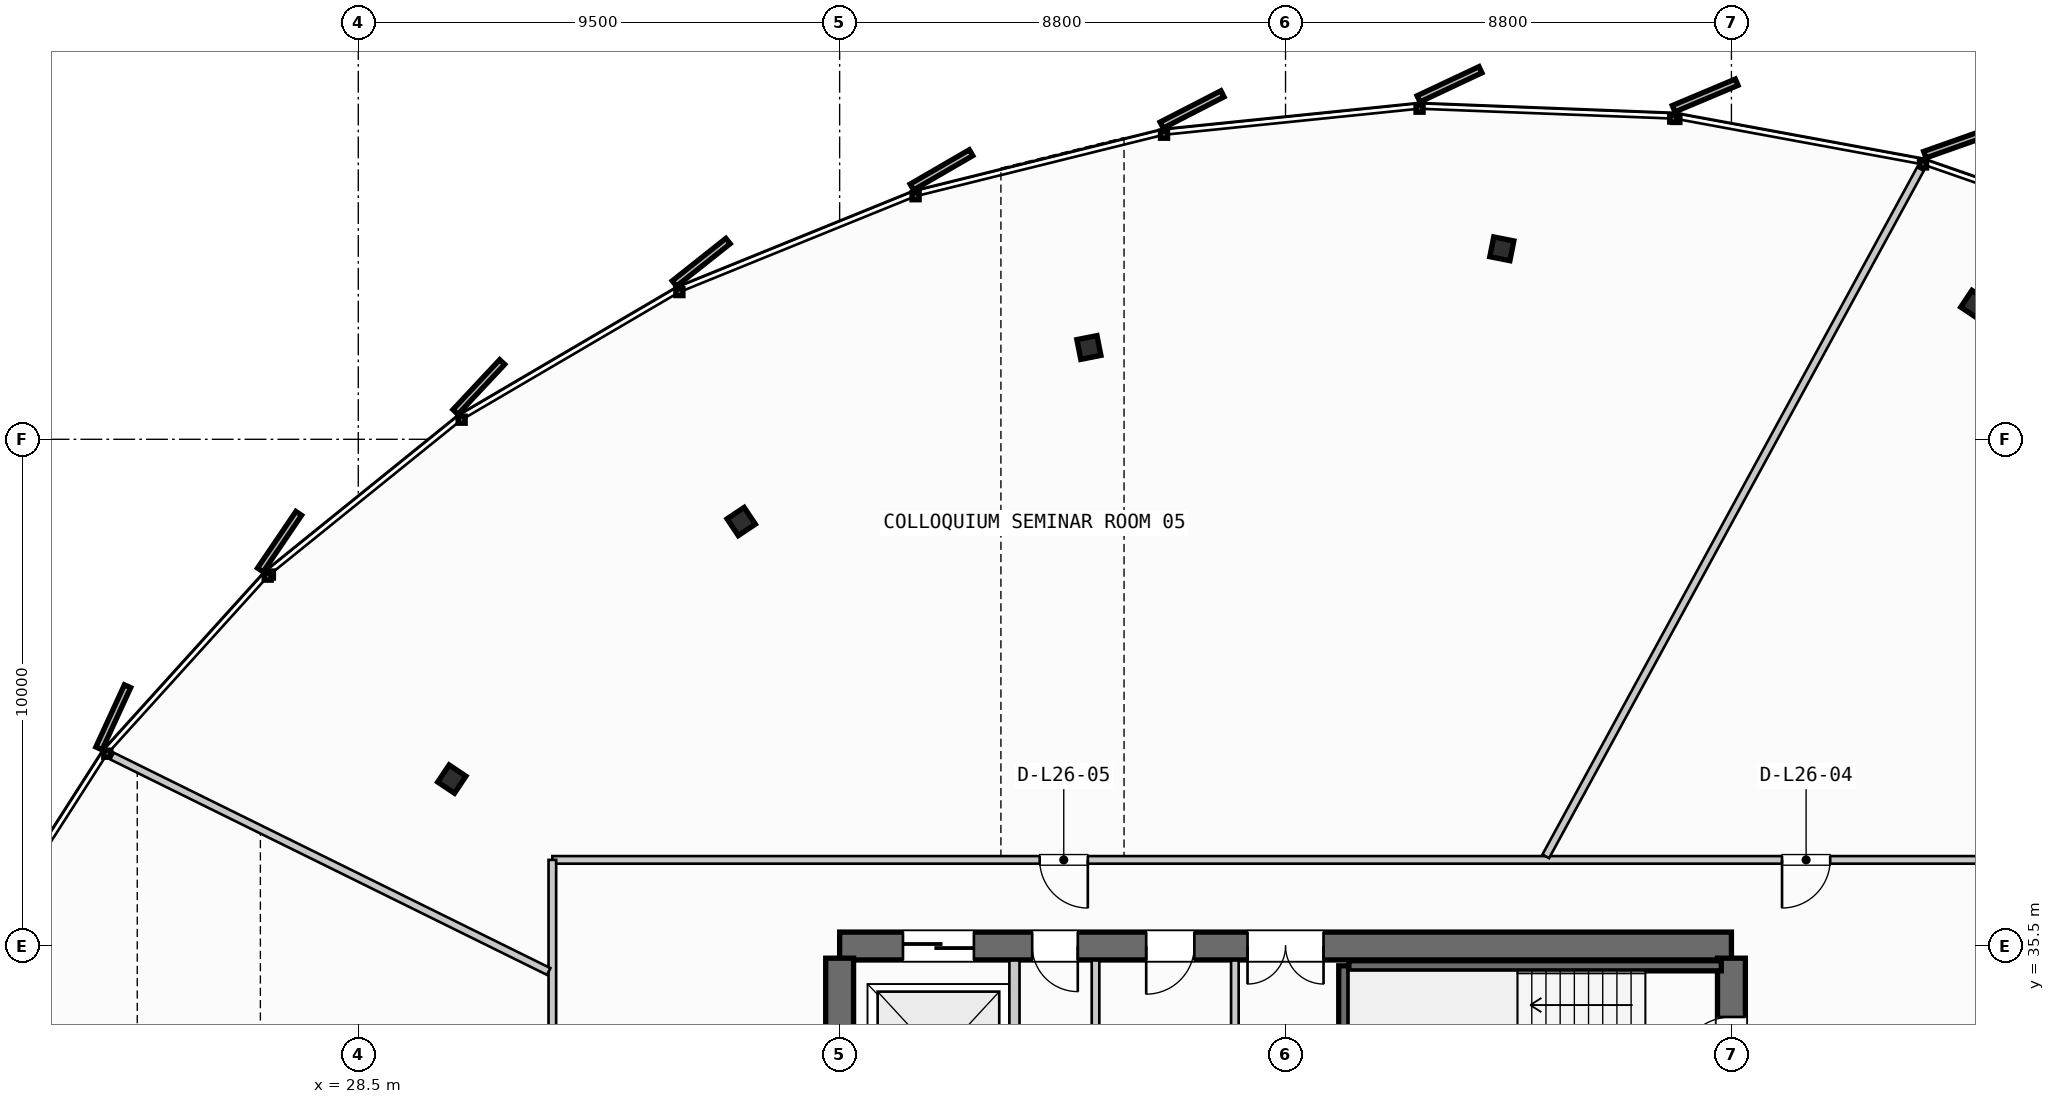
"""IFC4 building model, lengths in metres.
Left out: names, types, materials, properties, quantities, classifications, styles, units other than length and angle.
Written with IfcOpenShell. Run it as: python <this file> out.ifc"""

import sys

from ifc_helpers import new_model, si_unit, direction, frame, frame_2d, origin, origin_2d, place, context, subcontext, project, spatial, rectangle, i_section, extrude, source, transform, mapped, element, fill, save


model = new_model("IFC4")
c1 = context("Model", 3, precision=1e-05, world=origin(), true_north=direction((0.0, 1.0)))
c2 = subcontext(c1, "Body", "Model", "MODEL_VIEW")
j1 = project(units=[si_unit("LENGTHUNIT", "METRE"), si_unit("PLANEANGLEUNIT", "RADIAN")], contexts=[c1])
p1 = place(None, origin())
s1 = spatial("IfcSite", under=j1, at=p1, CompositionType="ELEMENT")
p2 = place(p1, origin())
s2 = spatial("IfcBuilding", under=s1, at=p2, CompositionType="ELEMENT")
p3 = place(p2, frame((0.0, 0.0, 107.2)))
s3 = spatial("IfcBuildingStorey", under=s2, at=p3, CompositionType="ELEMENT", Elevation=107.2)
p4 = place(p3, frame((55.6, 35.5, 0.0), z_axis=(0.0, 0.0, 1.0), x_axis=(-1.0, 0.0, 0.0)))
e1 = element("IfcWall", 1, at=p4, inside=s3, PredefinedType="SHEAR", context=c2, shape_type="SweptSolid", body=[
    extrude(rectangle(XDim=17.6, YDim=0.55, at=frame_2d((8.8, 0.0))), origin(), (0.0, 0.0, 1.0), 3.35),
])
p5 = place(p4, frame((8.05, 0.0, 0.0)))
e2 = element("IfcOpeningElement", 2, at=p5, cuts=e1, PredefinedType="OPENING", context=c2, shape_type="SweptSolid", body=[
    extrude(rectangle(XDim=1.5, YDim=2.2, at=frame_2d((0.75, 1.1))), frame((0.0, 0.285, 0.0), z_axis=(0.0, -1.0, 0.0), x_axis=(1.0, 0.0, 0.0)), (0.0, 0.0, 1.0), 0.57),
])
p6 = place(p4, frame((14.95, 0.0, 0.0)))
e3 = element("IfcOpeningElement", 3, at=p6, cuts=e1, PredefinedType="OPENING", context=c2, shape_type="SweptSolid", body=[
    extrude(rectangle(XDim=1.4, YDim=2.3, at=frame_2d((0.7, 1.15))), frame((0.0, 0.285, 0.0), z_axis=(0.0, -1.0, 0.0), x_axis=(1.0, 0.0, 0.0)), (0.0, 0.0, 1.0), 0.57),
])
p7 = place(p4, frame((12.9, 0.0, 0.0)))
e4 = element("IfcOpeningElement", 4, at=p7, cuts=e1, PredefinedType="OPENING", context=c2, shape_type="SweptSolid", body=[
    extrude(rectangle(XDim=0.9, YDim=2.15, at=frame_2d((0.45, 1.075))), frame((0.0, 0.285, 0.0), z_axis=(0.0, -1.0, 0.0), x_axis=(1.0, 0.0, 0.0)), (0.0, 0.0, 1.0), 0.57),
])
p8 = place(p4, frame((10.6, 0.0, 0.0)))
e5 = element("IfcOpeningElement", 5, at=p8, cuts=e1, PredefinedType="OPENING", context=c2, shape_type="SweptSolid", body=[
    extrude(rectangle(XDim=0.95, YDim=2.15, at=frame_2d((0.475, 1.075))), frame((0.0, 0.285, 0.0), z_axis=(0.0, -1.0, 0.0), x_axis=(1.0, 0.0, 0.0)), (0.0, 0.0, 1.0), 0.57),
])
p9 = place(p3, frame((38.0, 35.26, 0.0), z_axis=(0.0, 0.0, 1.0), x_axis=(0.0, -1.0, 0.0)))
e6 = element("IfcWall", 6, at=p9, inside=s3, PredefinedType="SHEAR", context=c2, shape_type="SweptSolid", body=[
    extrude(rectangle(XDim=14.92, YDim=0.55, at=frame_2d((7.46, 0.0))), origin(), (0.0, 0.0, 1.0), 3.35),
])
p10 = place(p9, frame((5.21, 0.0, 0.0)))
e7 = element("IfcOpeningElement", 7, at=p10, cuts=e6, PredefinedType="OPENING", context=c2, shape_type="SweptSolid", body=[
    extrude(rectangle(XDim=1.1, YDim=2.2, at=frame_2d((0.55, 1.1))), frame((0.0, 0.285, 0.0), z_axis=(0.0, -1.0, 0.0), x_axis=(1.0, 0.0, 0.0)), (0.0, 0.0, 1.0), 0.57),
])
p11 = place(p3, frame((55.6, 20.34, 0.0), z_axis=(0.0, 0.0, 1.0), x_axis=(0.0, 1.0, 0.0)))
e8 = element("IfcWall", 8, at=p11, inside=s3, PredefinedType="SHEAR", context=c2, shape_type="SweptSolid", body=[
    extrude(rectangle(XDim=14.92, YDim=0.55, at=frame_2d((7.46, 0.0))), origin(), (0.0, 0.0, 1.0), 3.35),
])
p12 = place(p11, frame((12.71, 0.0, 0.0)))
e9 = element("IfcOpeningElement", 9, at=p12, cuts=e8, PredefinedType="OPENING", context=c2, shape_type="SweptSolid", body=[
    extrude(rectangle(XDim=1.05, YDim=2.15, at=frame_2d((0.525, 1.075))), frame((0.0, 0.285, 0.0), z_axis=(0.0, -1.0, 0.0), x_axis=(1.0, 0.0, 0.0)), (0.0, 0.0, 1.0), 0.57),
])
p13 = place(p11, frame((8.61, 0.0, 0.0)))
e10 = element("IfcOpeningElement", 10, at=p13, cuts=e8, PredefinedType="OPENING", context=c2, shape_type="SweptSolid", body=[
    extrude(rectangle(XDim=1.1, YDim=2.2, at=frame_2d((0.55, 1.1))), frame((0.0, 0.285, 0.0), z_axis=(0.0, -1.0, 0.0), x_axis=(1.0, 0.0, 0.0)), (0.0, 0.0, 1.0), 0.57),
])
m1 = source(origin(), c2, "Body", "SweptSolid", [
    extrude(i_section(OverallWidth=0.405, OverallDepth=0.398, WebThickness=0.035, FlangeThickness=0.056, FilletRadius=0.015, at=origin_2d()), origin(), (0.0, 0.0, 1.0), 3.35),
])
for number, where, z_axis, x_axis in (
    (11, (60.405, 48.161, 0.0), (0.0, 0.0, 1.0), (0.556, 0.831, 0.0)),
    (12, (51.069, 49.259, 0.0), (0.0, 0.0, 1.0), (0.195, 0.981, 0.0)),
    (13, (42.919, 47.311, 0.0), (0.0, 0.0, 1.0), (-0.195, 0.981, 0.0)),
    (14, (36.058, 43.877, 0.0), (0.0, 0.0, 1.0), (-0.556, 0.831, 0.0)),
    (15, (30.346, 38.794, 0.0), (0.0, 0.0, 1.0), (-0.831, 0.556, 0.0)),
):
    element("IfcColumn", number, at=place(p3, frame(where, z_axis=z_axis, x_axis=x_axis)), inside=s3, PredefinedType="COLUMN", context=c2, shape_type="MappedRepresentation", body=[
        mapped(m1, transform((0.0, 0.0, 0.0), scale=1.0)),
    ])
p14 = place(p3, frame((47.95, 32.05, 0.0), z_axis=(0.0, 0.0, 1.0), x_axis=(0.0, 1.0, 0.0)))
e16 = element("IfcWall", 16, at=p14, inside=s3, PredefinedType="SHEAR", context=c2, shape_type="SweptSolid", body=[
    extrude(rectangle(XDim=3.06, YDim=0.2, at=frame_2d((1.53, 0.0))), origin(), (0.0, 0.0, 1.0), 3.35),
])
p15 = place(p3, frame((48.05, 35.11, 0.0), z_axis=(0.0, 0.0, 1.0), x_axis=(1.0, 0.0, 0.0)))
e17 = element("IfcWall", 17, at=p15, inside=s3, PredefinedType="SHEAR", context=c2, shape_type="SweptSolid", body=[
    extrude(rectangle(XDim=7.35, YDim=0.2, at=frame_2d((3.675, 0.0))), origin(), (0.0, 0.0, 1.0), 3.35),
])
p16 = place(p3, frame((41.45, 31.85, 0.0), z_axis=(0.0, 0.0, 1.0), x_axis=(0.0, 1.0, 0.0)))
e18 = element("IfcWall", 18, at=p16, inside=s3, PredefinedType="PARTITIONING", context=c2, shape_type="SweptSolid", body=[
    extrude(rectangle(XDim=3.365, YDim=0.2, at=frame_2d((1.683, 0.0))), origin(), (0.0, 0.0, 1.0), 2.28),
])
p17 = place(p3, frame((45.8, 31.85, 0.0), z_axis=(0.0, 0.0, 1.0), x_axis=(0.0, 1.0, 0.0)))
e19 = element("IfcWall", 19, at=p17, inside=s3, PredefinedType="PARTITIONING", context=c2, shape_type="SweptSolid", body=[
    extrude(rectangle(XDim=3.365, YDim=0.15, at=frame_2d((1.683, 0.0))), origin(), (0.0, 0.0, 1.0), 2.28),
])
p18 = place(p3, frame((43.05, 31.85, 0.0), z_axis=(0.0, 0.0, 1.0), x_axis=(0.0, 1.0, 0.0)))
e20 = element("IfcWall", 20, at=p18, inside=s3, PredefinedType="PLUMBINGWALL", context=c2, shape_type="SweptSolid", body=[
    extrude(rectangle(XDim=3.365, YDim=0.15, at=frame_2d((1.683, 0.0))), origin(), (0.0, 0.0, 1.0), 2.28),
])
p19 = place(p3, frame((62.83, 37.2, 0.0), z_axis=(0.0, 0.0, 1.0), x_axis=(-1.0, 0.0, 0.0)))
e21 = element("IfcWall", 21, at=p19, inside=s3, PredefinedType="PARTITIONING", context=c2, shape_type="SweptSolid", body=[
    extrude(rectangle(XDim=30.5, YDim=0.15, at=frame_2d((15.25, 0.0))), origin(), (0.0, 0.0, 1.0), 2.28),
])
p20 = place(p19, frame((5.281, 0.0, 0.0)))
e22 = element("IfcOpeningElement", 22, at=p20, cuts=e21, PredefinedType="OPENING", context=c2, shape_type="SweptSolid", body=[
    extrude(rectangle(XDim=0.95, YDim=2.15, at=frame_2d((0.475, 1.075))), frame((0.0, 0.085, 0.0), z_axis=(0.0, -1.0, 0.0), x_axis=(1.0, 0.0, 0.0)), (0.0, 0.0, 1.0), 0.17),
])
p21 = place(p19, frame((19.932, 0.0, 0.0)))
e23 = element("IfcOpeningElement", 23, at=p21, cuts=e21, PredefinedType="OPENING", context=c2, shape_type="SweptSolid", body=[
    extrude(rectangle(XDim=0.95, YDim=2.15, at=frame_2d((0.475, 1.075))), frame((0.0, 0.085, 0.0), z_axis=(0.0, -1.0, 0.0), x_axis=(1.0, 0.0, 0.0)), (0.0, 0.0, 1.0), 0.17),
])
p22 = place(p3, frame((32.33, 37.2, 0.0), z_axis=(0.0, 0.0, 1.0), x_axis=(0.0, -1.0, 0.0)))
e24 = element("IfcWall", 24, at=p22, inside=s3, PredefinedType="PARTITIONING", context=c2, shape_type="SweptSolid", body=[
    extrude(rectangle(XDim=19.22, YDim=0.15, at=frame_2d((9.61, 0.0))), origin(), (0.0, 0.0, 1.0), 2.28),
])
p23 = place(p22, frame((8.908, 0.0, 0.0)))
e25 = element("IfcOpeningElement", 25, at=p23, cuts=e24, PredefinedType="OPENING", context=c2, shape_type="SweptSolid", body=[
    extrude(rectangle(XDim=0.95, YDim=2.15, at=frame_2d((0.475, 1.075))), frame((0.0, 0.085, 0.0), z_axis=(0.0, -1.0, 0.0), x_axis=(1.0, 0.0, 0.0)), (0.0, 0.0, 1.0), 0.17),
])
p24 = place(p3, frame((51.936, 37.27, 0.0), z_axis=(0.0, 0.0, 1.0), x_axis=(0.47870484944, 0.877975892108, 0.0)))
e26 = element("IfcWall", 26, at=p24, inside=s3, PredefinedType="PARTITIONING", context=c2, shape_type="SweptSolid", body=[
    extrude(rectangle(XDim=15.448, YDim=0.15, at=frame_2d((7.724, 0.0))), origin(), (0.0, 0.0, 1.0), 2.28),
])
p25 = place(p3, frame((32.258, 34.997, 0.0), z_axis=(0.0, 0.0, 1.0), x_axis=(-0.896802793209, 0.442430503121, 0.0)))
e27 = element("IfcWall", 27, at=p25, inside=s3, PredefinedType="PARTITIONING", context=c2, shape_type="SweptSolid", body=[
    extrude(rectangle(XDim=9.609, YDim=0.15, at=frame_2d((4.804, 0.0))), origin(), (0.0, 0.0, 1.0), 2.28),
])
m2 = source(origin(), c2, "Body", "SweptSolid", [
    extrude(rectangle(XDim=1.05, YDim=2.15, at=frame_2d((0.525, 1.075))), frame((0.0, 0.025, 0.0), z_axis=(0.0, -1.0, 0.0), x_axis=(1.0, 0.0, 0.0)), (0.0, 0.0, 1.0), 0.05),
])
p26 = place(p12, origin())
e28 = element("IfcDoor", 28, at=p26, inside=s3, OperationType="SINGLE_SWING_LEFT", PredefinedType="DOOR", context=c2, shape_type="MappedRepresentation", body=[
    mapped(m2, transform((0.0, 0.0, 0.0), scale=1.0)),
])
fill(e9, e28)
m3 = source(origin(), c2, "Body", "SweptSolid", [
    extrude(rectangle(XDim=1.5, YDim=2.2, at=frame_2d((0.75, 1.1))), frame((0.0, 0.025, 0.0), z_axis=(0.0, -1.0, 0.0), x_axis=(1.0, 0.0, 0.0)), (0.0, 0.0, 1.0), 0.05),
])
p27 = place(p5, origin())
e29 = element("IfcDoor", 29, at=p27, inside=s3, OperationType="DOUBLE_DOOR_SINGLE_SWING", PredefinedType="DOOR", context=c2, shape_type="MappedRepresentation", body=[
    mapped(m3, transform((0.0, 0.0, 0.0), scale=1.0)),
])
fill(e2, e29)
m4 = source(origin(), c2, "Body", "SweptSolid", [
    extrude(rectangle(XDim=1.4, YDim=2.3, at=frame_2d((0.7, 1.15))), frame((0.0, 0.025, 0.0), z_axis=(0.0, -1.0, 0.0), x_axis=(1.0, 0.0, 0.0)), (0.0, 0.0, 1.0), 0.05),
])
p28 = place(p6, origin())
e30 = element("IfcDoor", 30, at=p28, inside=s3, OperationType="SLIDING_TO_RIGHT", PredefinedType="DOOR", context=c2, shape_type="MappedRepresentation", body=[
    mapped(m4, transform((0.0, 0.0, 0.0), scale=1.0)),
])
fill(e3, e30)
m5 = source(origin(), c2, "Body", "SweptSolid", [
    extrude(rectangle(XDim=0.9, YDim=2.15, at=frame_2d((0.45, 1.075))), frame((0.0, 0.025, 0.0), z_axis=(0.0, -1.0, 0.0), x_axis=(1.0, 0.0, 0.0)), (0.0, 0.0, 1.0), 0.05),
])
p29 = place(p7, origin())
e31 = element("IfcDoor", 31, at=p29, inside=s3, OperationType="SINGLE_SWING_LEFT", PredefinedType="DOOR", context=c2, shape_type="MappedRepresentation", body=[
    mapped(m5, transform((0.0, 0.0, 0.0), scale=1.0)),
])
fill(e4, e31)
m6 = source(origin(), c2, "Body", "SweptSolid", [
    extrude(rectangle(XDim=0.95, YDim=2.15, at=frame_2d((0.475, 1.075))), frame((0.0, 0.025, 0.0), z_axis=(0.0, -1.0, 0.0), x_axis=(1.0, 0.0, 0.0)), (0.0, 0.0, 1.0), 0.05),
])
p30 = place(p8, origin())
e32 = element("IfcDoor", 32, at=p30, inside=s3, OperationType="SINGLE_SWING_RIGHT", PredefinedType="DOOR", context=c2, shape_type="MappedRepresentation", body=[
    mapped(m6, transform((0.0, 0.0, 0.0), scale=1.0)),
])
fill(e5, e32)
p31 = place(p20, origin())
e33 = element("IfcDoor", 33, at=p31, inside=s3, OperationType="SINGLE_SWING_RIGHT", PredefinedType="DOOR", context=c2, shape_type="MappedRepresentation", body=[
    mapped(m6, transform((0.0, 0.0, 0.0), scale=1.0)),
])
fill(e22, e33)
p32 = place(p21, origin())
e34 = element("IfcDoor", 34, at=p32, inside=s3, OperationType="SINGLE_SWING_LEFT", PredefinedType="DOOR", context=c2, shape_type="MappedRepresentation", body=[
    mapped(m6, transform((0.0, 0.0, 0.0), scale=1.0)),
])
fill(e23, e34)
save(model, sys.argv[1])
